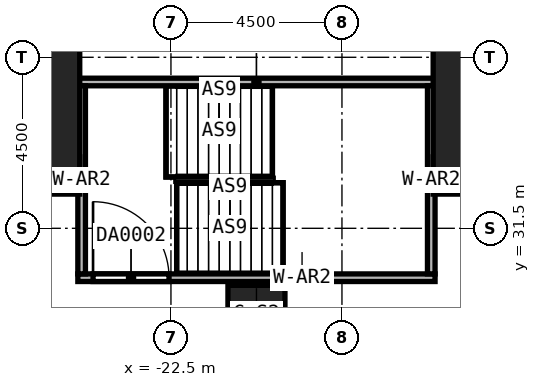
"""IFC4 building model, lengths in metres.
Left out: names, types, materials, properties, quantities, classifications, styles, units other than length and angle.
Written with IfcOpenShell. Run it as: python <this file> out.ifc"""

import sys

from ifc_helpers import new_model, si_unit, direction, frame, frame_2d, origin, origin_2d, place, context, subcontext, project, spatial, rectangle, extrude, element, fill, save


model = new_model("IFC4")
c1 = context("Model", 3, precision=1e-05, world=origin(), true_north=direction((0.0, 1.0)))
c2 = subcontext(c1, "Body", "Model", "MODEL_VIEW")
j1 = project(units=[si_unit("LENGTHUNIT", "METRE"), si_unit("PLANEANGLEUNIT", "RADIAN")], contexts=[c1])
p1 = place(None, origin())
s1 = spatial("IfcSite", under=j1, at=p1, CompositionType="ELEMENT")
p2 = place(p1, origin())
s2 = spatial("IfcBuilding", under=s1, at=p2, CompositionType="ELEMENT")
p3 = place(p2, frame((0.0, 0.0, 12.0)))
s3 = spatial("IfcBuildingStorey", under=s2, at=p3, CompositionType="ELEMENT", Elevation=12.0)
for number, where, z_axis, x_axis in (
    (1, (-27.0, 35.7, 0.0), (0.0, 0.0, 1.0), (1.0, 0.0, 0.0)),
    (2, (-13.5, 35.7, 0.0), (0.0, 0.0, 1.0), (1.0, 0.0, 0.0)),
):
    element("IfcColumn", number, at=place(p3, frame(where, z_axis=z_axis, x_axis=x_axis)), inside=s3, PredefinedType="COLUMN", context=c2, shape_type="SweptSolid", body=[
        extrude(rectangle(XDim=4.2, YDim=6.6, at=origin_2d()), origin(), (0.0, 0.0, 1.0), 7.0),
    ])
p4 = place(p3, frame((-20.25, 29.25, 0.0), z_axis=(0.0, 0.0, 1.0), x_axis=(1.0, 0.0, 0.0)))
e3 = element("IfcColumn", 3, at=p4, inside=s3, PredefinedType="COLUMN", context=c2, shape_type="SweptSolid", body=[
    extrude(rectangle(XDim=1.5, YDim=1.5, at=origin_2d()), origin(), (0.0, 0.0, 1.0), 7.0),
])
p5 = place(p3, frame((-24.95, 30.2, 0.0), z_axis=(0.0, 0.0, 1.0), x_axis=(1.0, 0.0, 0.0)))
e4 = element("IfcWall", 4, at=p5, inside=s3, PredefinedType="SOLIDWALL", context=c2, shape_type="SweptSolid", body=[
    extrude(rectangle(XDim=9.4, YDim=0.2, at=frame_2d((4.7, 0.0))), origin(), (0.0, 0.0, 1.0), 7.0),
])
p6 = place(p5, frame((0.4, 0.0, 0.0)))
e5 = element("IfcOpeningElement", 5, at=p6, cuts=e4, PredefinedType="OPENING", context=c2, shape_type="SweptSolid", body=[
    extrude(rectangle(XDim=2.0, YDim=2.4, at=frame_2d((1.0, 1.2))), frame((0.0, 0.1, 0.0), z_axis=(0.0, -1.0, 0.0), x_axis=(1.0, 0.0, 0.0)), (0.0, 0.0, 1.0), 0.2),
])
p7 = place(p3, frame((-24.95, 35.35, 0.0), z_axis=(0.0, 0.0, 1.0), x_axis=(1.0, 0.0, 0.0)))
e6 = element("IfcWall", 6, at=p7, inside=s3, PredefinedType="SOLIDWALL", context=c2, shape_type="SweptSolid", body=[
    extrude(rectangle(XDim=9.4, YDim=0.2, at=frame_2d((4.7, 0.0))), origin(), (0.0, 0.0, 1.0), 7.0),
])
for number, where, z_axis, x_axis in (
    (7, (-24.85, 30.3, 0.0), (0.0, 0.0, 1.0), (0.0, 1.0, 0.0)),
    (8, (-15.65, 30.3, 0.0), (0.0, 0.0, 1.0), (0.0, 1.0, 0.0)),
):
    element("IfcWall", number, at=place(p3, frame(where, z_axis=z_axis, x_axis=x_axis)), inside=s3, PredefinedType="SOLIDWALL", context=c2, shape_type="SweptSolid", body=[
        extrude(rectangle(XDim=4.95, YDim=0.2, at=frame_2d((2.475, 0.0))), origin(), (0.0, 0.0, 1.0), 7.0),
    ])
p8 = place(p6, origin())
e9 = element("IfcDoor", 9, at=p8, inside=s3, OperationType="DOUBLE_DOOR_SINGLE_SWING", PredefinedType="DOOR", context=c2, shape_type="SweptSolid", body=[
    extrude(rectangle(XDim=2.0, YDim=2.4, at=frame_2d((1.0, 1.2))), frame((0.0, 0.025, 0.0), z_axis=(0.0, -1.0, 0.0), x_axis=(1.0, 0.0, 0.0)), (0.0, 0.0, 1.0), 0.05),
])
fill(e5, e9)
save(model, sys.argv[1])
